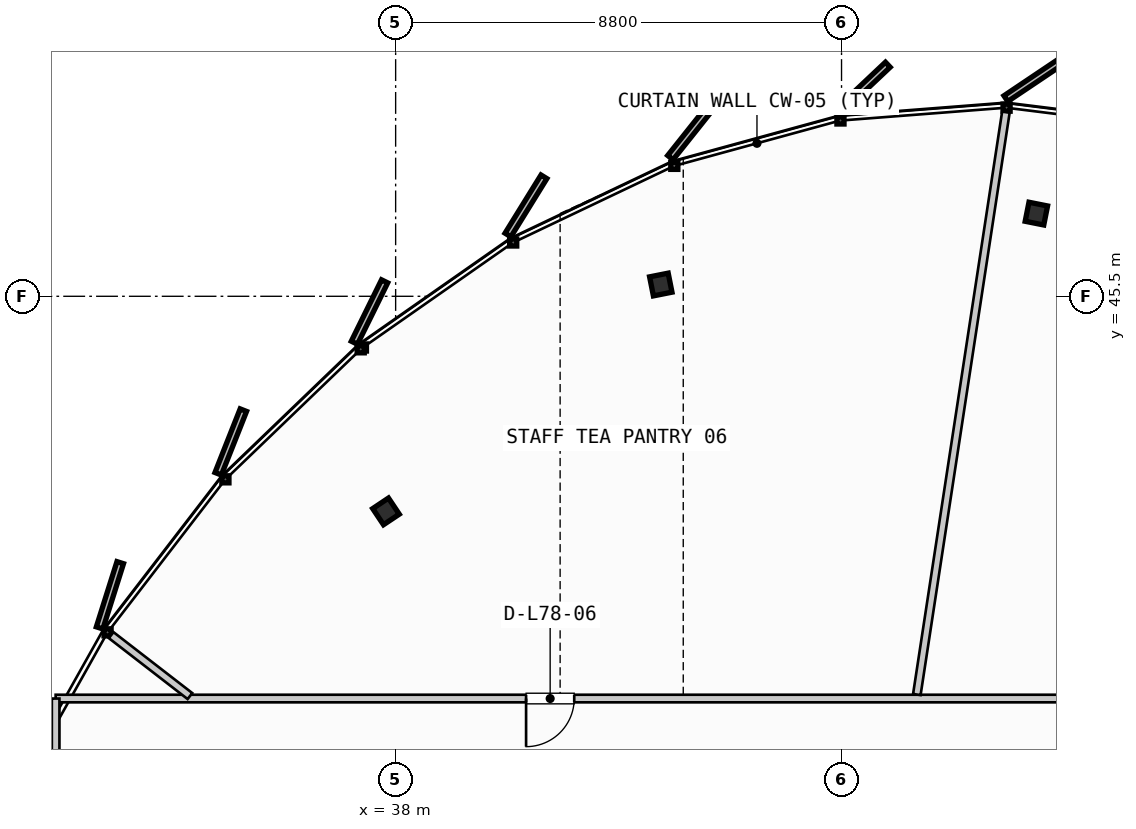
"""IFC4 building model, lengths in metres.
Left out: names, types, materials, properties, quantities, classifications, styles, units other than length and angle.
Written with IfcOpenShell. Run it as: python <this file> out.ifc"""

import sys

from ifc_helpers import new_model, si_unit, direction, frame, frame_2d, origin, origin_2d, place, context, subcontext, project, spatial, rectangle, i_section, extrude, source, transform, mapped, element, fill, save


model = new_model("IFC4")
c1 = context("Model", 3, precision=1e-05, world=origin(), true_north=direction((0.0, 1.0)))
c2 = subcontext(c1, "Body", "Model", "MODEL_VIEW")
j1 = project(units=[si_unit("LENGTHUNIT", "METRE"), si_unit("PLANEANGLEUNIT", "RADIAN")], contexts=[c1])
p1 = place(None, origin())
s1 = spatial("IfcSite", under=j1, at=p1, CompositionType="ELEMENT")
p2 = place(p1, origin())
s2 = spatial("IfcBuilding", under=s1, at=p2, CompositionType="ELEMENT")
p3 = place(p2, frame((0.0, 0.0, 293.95)))
s3 = spatial("IfcBuildingStorey", under=s2, at=p3, CompositionType="ELEMENT", Elevation=293.95)
m1 = source(origin(), c2, "Body", "SweptSolid", [
    extrude(i_section(OverallWidth=0.374, OverallDepth=0.383, WebThickness=0.017, FlangeThickness=0.026, FilletRadius=0.015, at=origin_2d()), origin(), (0.0, 0.0, 1.0), 3.21),
])
for number, where, z_axis, x_axis in (
    (1, (50.645, 47.132, 0.0), (0.0, 0.0, 1.0), (0.195, 0.981, 0.0)),
    (2, (43.233, 45.732, 0.0), (0.0, 0.0, 1.0), (-0.195, 0.981, 0.0)),
    (3, (37.81, 41.255, 0.0), (0.0, 0.0, 1.0), (-0.556, 0.831, 0.0)),
):
    element("IfcColumn", number, at=place(p3, frame(where, z_axis=z_axis, x_axis=x_axis)), inside=s3, PredefinedType="COLUMN", context=c2, shape_type="MappedRepresentation", body=[
        mapped(m1, transform((0.0, 0.0, 0.0), scale=1.0)),
    ])
p4 = place(p3, frame((61.564, 37.562, 0.0), z_axis=(0.0, 0.0, 1.0), x_axis=(-1.0, 0.0, 0.0)))
e4 = element("IfcWall", 4, at=p4, inside=s3, PredefinedType="PARTITIONING", context=c2, shape_type="SweptSolid", body=[
    extrude(rectangle(XDim=30.274, YDim=0.15, at=frame_2d((15.137, 0.0))), origin(), (0.0, 0.0, 1.0), 2.315),
])
p5 = place(p4, frame((7.545, 0.0, 0.0)))
e5 = element("IfcOpeningElement", 5, at=p5, cuts=e4, PredefinedType="OPENING", context=c2, shape_type="SweptSolid", body=[
    extrude(rectangle(XDim=0.95, YDim=2.15, at=frame_2d((0.475, 1.075))), frame((0.0, 0.085, 0.0), z_axis=(0.0, -1.0, 0.0), x_axis=(1.0, 0.0, 0.0)), (0.0, 0.0, 1.0), 0.17),
])
p6 = place(p4, frame((20.04, 0.0, 0.0)))
e6 = element("IfcOpeningElement", 6, at=p6, cuts=e4, PredefinedType="OPENING", context=c2, shape_type="SweptSolid", body=[
    extrude(rectangle(XDim=0.95, YDim=2.15, at=frame_2d((0.475, 1.075))), frame((0.0, 0.085, 0.0), z_axis=(0.0, -1.0, 0.0), x_axis=(1.0, 0.0, 0.0)), (0.0, 0.0, 1.0), 0.17),
])
p7 = place(p3, frame((31.29, 37.562, 0.0), z_axis=(0.0, 0.0, 1.0), x_axis=(0.0, -1.0, 0.0)))
e7 = element("IfcWall", 7, at=p7, inside=s3, PredefinedType="PARTITIONING", context=c2, shape_type="SweptSolid", body=[
    extrude(rectangle(XDim=19.293, YDim=0.15, at=frame_2d((9.646, 0.0))), origin(), (0.0, 0.0, 1.0), 2.315),
])
p8 = place(p7, frame((4.525, 0.0, 0.0)))
e8 = element("IfcOpeningElement", 8, at=p8, cuts=e7, PredefinedType="OPENING", context=c2, shape_type="SweptSolid", body=[
    extrude(rectangle(XDim=0.95, YDim=2.15, at=frame_2d((0.475, 1.075))), frame((0.0, 0.085, 0.0), z_axis=(0.0, -1.0, 0.0), x_axis=(1.0, 0.0, 0.0)), (0.0, 0.0, 1.0), 0.17),
])
p9 = place(p7, frame((13.992, 0.0, 0.0)))
e9 = element("IfcOpeningElement", 9, at=p9, cuts=e7, PredefinedType="OPENING", context=c2, shape_type="SweptSolid", body=[
    extrude(rectangle(XDim=0.95, YDim=2.15, at=frame_2d((0.475, 1.075))), frame((0.0, 0.085, 0.0), z_axis=(0.0, -1.0, 0.0), x_axis=(1.0, 0.0, 0.0)), (0.0, 0.0, 1.0), 0.17),
])
p10 = place(p3, frame((48.286, 37.641, 0.0), z_axis=(0.0, 0.0, 1.0), x_axis=(0.151178163671, 0.988506531506, 0.0)))
e10 = element("IfcWall", 10, at=p10, inside=s3, PredefinedType="PARTITIONING", context=c2, shape_type="SweptSolid", body=[
    extrude(rectangle(XDim=11.626, YDim=0.15, at=frame_2d((5.813, 0.0))), origin(), (0.0, 0.0, 1.0), 2.315),
])
p11 = place(p3, frame((33.94, 37.611, 0.0), z_axis=(0.0, 0.0, 1.0), x_axis=(-0.791041760973, 0.611762153452, 0.0)))
e11 = element("IfcWall", 11, at=p11, inside=s3, PredefinedType="PARTITIONING", context=c2, shape_type="SweptSolid", body=[
    extrude(rectangle(XDim=1.965, YDim=0.15, at=frame_2d((0.982, 0.0))), origin(), (0.0, 0.0, 1.0), 2.315),
])
m2 = source(origin(), c2, "Body", "SweptSolid", [
    extrude(rectangle(XDim=0.95, YDim=2.15, at=frame_2d((0.475, 1.075))), frame((0.0, 0.025, 0.0), z_axis=(0.0, -1.0, 0.0), x_axis=(1.0, 0.0, 0.0)), (0.0, 0.0, 1.0), 0.05),
])
p12 = place(p6, origin())
e12 = element("IfcDoor", 12, at=p12, inside=s3, OperationType="SINGLE_SWING_RIGHT", PredefinedType="DOOR", context=c2, shape_type="MappedRepresentation", body=[
    mapped(m2, transform((0.0, 0.0, 0.0), scale=1.0)),
])
fill(e6, e12)
save(model, sys.argv[1])
